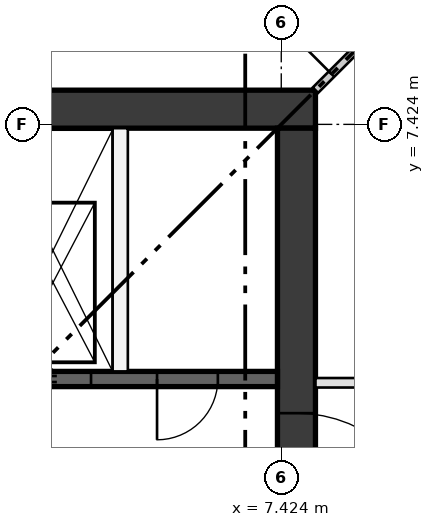
"""IFC4 building model, lengths in metres.
Left out: names, types, materials, properties, quantities, classifications, styles, units other than length and angle.
Written with IfcOpenShell. Run it as: python <this file> out.ifc"""

import sys

from ifc_helpers import new_model, si_unit, direction, frame, frame_2d, origin, place, context, subcontext, project, spatial, rectangle, extrude, element, fill, save


model = new_model("IFC4")
c1 = context("Model", 3, precision=1e-05, world=origin(), true_north=direction((0.0, 1.0)))
c2 = subcontext(c1, "Body", "Model", "MODEL_VIEW")
j1 = project(units=[si_unit("LENGTHUNIT", "METRE"), si_unit("PLANEANGLEUNIT", "RADIAN")], contexts=[c1])
p1 = place(None, origin())
s1 = spatial("IfcSite", under=j1, at=p1, CompositionType="ELEMENT")
p2 = place(p1, origin())
s2 = spatial("IfcBuilding", under=s1, at=p2, CompositionType="ELEMENT")
p3 = place(p2, frame((0.0, 0.0, 224.5)))
s3 = spatial("IfcBuildingStorey", under=s2, at=p3, CompositionType="ELEMENT", Elevation=224.5)
p4 = place(p3, frame((-7.874, 7.624, 0.0), z_axis=(0.0, 0.0, 1.0), x_axis=(1.0, 0.0, 0.0)))
e1 = element("IfcWall", 1, at=p4, inside=s3, PredefinedType="SHEAR", context=c2, shape_type="SweptSolid", body=[
    extrude(rectangle(XDim=15.748, YDim=0.5, at=frame_2d((7.874, 0.0))), origin(), (0.0, 0.0, 1.0), 3.35),
])
p5 = place(p3, frame((7.624, -7.374, 0.0), z_axis=(0.0, 0.0, 1.0), x_axis=(0.0, 1.0, 0.0)))
e2 = element("IfcWall", 2, at=p5, inside=s3, PredefinedType="SHEAR", context=c2, shape_type="SweptSolid", body=[
    extrude(rectangle(XDim=14.748, YDim=0.5, at=frame_2d((7.374, 0.0))), origin(), (0.0, 0.0, 1.0), 3.35),
])
p6 = place(p5, frame((6.874, 0.0, 0.0)))
e3 = element("IfcOpeningElement", 3, at=p6, cuts=e2, PredefinedType="OPENING", context=c2, shape_type="SweptSolid", body=[
    extrude(rectangle(XDim=1.0, YDim=2.1, at=frame_2d((0.5, 1.05))), frame((0.0, 0.26, 0.0), z_axis=(0.0, -1.0, 0.0), x_axis=(1.0, 0.0, 0.0)), (0.0, 0.0, 1.0), 0.52),
])
p7 = place(p5, frame((3.75, 0.0, 0.0)))
e4 = element("IfcOpeningElement", 4, at=p7, cuts=e2, PredefinedType="OPENING", context=c2, shape_type="SweptSolid", body=[
    extrude(rectangle(XDim=1.8, YDim=2.1, at=frame_2d((0.9, 1.05))), frame((0.0, 0.26, 0.0), z_axis=(0.0, -1.0, 0.0), x_axis=(1.0, 0.0, 0.0)), (0.0, 0.0, 1.0), 0.52),
])
p8 = place(p5, frame((9.198, 0.0, 0.0)))
e5 = element("IfcOpeningElement", 5, at=p8, cuts=e2, PredefinedType="OPENING", context=c2, shape_type="SweptSolid", body=[
    extrude(rectangle(XDim=1.8, YDim=2.1, at=frame_2d((0.9, 1.05))), frame((0.0, 0.26, 0.0), z_axis=(0.0, -1.0, 0.0), x_axis=(1.0, 0.0, 0.0)), (0.0, 0.0, 1.0), 0.52),
])
p9 = place(p3, frame((0.0, 4.074, 0.0), z_axis=(0.0, 0.0, 1.0), x_axis=(1.0, 0.0, 0.0)))
e6 = element("IfcWall", 6, at=p9, inside=s3, PredefinedType="SHEAR", context=c2, shape_type="SweptSolid", body=[
    extrude(rectangle(XDim=7.374, YDim=0.2, at=frame_2d((3.687, 0.0))), origin(), (0.0, 0.0, 1.0), 3.0),
])
p10 = place(p9, frame((0.384, 0.0, 0.0)))
e7 = element("IfcOpeningElement", 7, at=p10, cuts=e6, PredefinedType="OPENING", context=c2, shape_type="SweptSolid", body=[
    extrude(rectangle(XDim=1.0, YDim=2.1, at=frame_2d((0.5, 1.05))), frame((0.0, 0.11, 0.0), z_axis=(0.0, -1.0, 0.0), x_axis=(1.0, 0.0, 0.0)), (0.0, 0.0, 1.0), 0.22),
])
p11 = place(p9, frame((2.153, 0.0, 0.0)))
e8 = element("IfcOpeningElement", 8, at=p11, cuts=e6, PredefinedType="OPENING", context=c2, shape_type="SweptSolid", body=[
    extrude(rectangle(XDim=1.0, YDim=2.1, at=frame_2d((0.5, 1.05))), frame((0.0, 0.11, 0.0), z_axis=(0.0, -1.0, 0.0), x_axis=(1.0, 0.0, 0.0)), (0.0, 0.0, 1.0), 0.22),
])
p12 = place(p9, frame((3.921, 0.0, 0.0)))
e9 = element("IfcOpeningElement", 9, at=p12, cuts=e6, PredefinedType="OPENING", context=c2, shape_type="SweptSolid", body=[
    extrude(rectangle(XDim=1.0, YDim=2.1, at=frame_2d((0.5, 1.05))), frame((0.0, 0.11, 0.0), z_axis=(0.0, -1.0, 0.0), x_axis=(1.0, 0.0, 0.0)), (0.0, 0.0, 1.0), 0.22),
])
p13 = place(p9, frame((5.79, 0.0, 0.0)))
e10 = element("IfcOpeningElement", 10, at=p13, cuts=e6, PredefinedType="OPENING", context=c2, shape_type="SweptSolid", body=[
    extrude(rectangle(XDim=0.8, YDim=2.1, at=frame_2d((0.4, 1.05))), frame((0.0, 0.11, 0.0), z_axis=(0.0, -1.0, 0.0), x_axis=(1.0, 0.0, 0.0)), (0.0, 0.0, 1.0), 0.22),
])
p14 = place(p3, frame((5.305, 4.174, 0.0), z_axis=(0.0, 0.0, 1.0), x_axis=(0.0, 1.0, 0.0)))
e11 = element("IfcWall", 11, at=p14, inside=s3, PredefinedType="PARTITIONING", context=c2, shape_type="SweptSolid", body=[
    extrude(rectangle(XDim=3.2, YDim=0.2, at=frame_2d((1.6, 0.0))), origin(), (0.0, 0.0, 1.0), 3.0),
])
p15 = place(p3, frame((7.874, 4.024, 0.0), z_axis=(0.0, 0.0, 1.0), x_axis=(1.0, 0.0, 0.0)))
e12 = element("IfcWall", 12, at=p15, inside=s3, PredefinedType="PARTITIONING", context=c2, shape_type="SweptSolid", body=[
    extrude(rectangle(XDim=2.317, YDim=0.125, at=frame_2d((1.158, 0.0))), origin(), (0.0, 0.0, 1.0), 3.0),
])
p16 = place(p15, frame((0.7, 0.0, 0.0)))
e13 = element("IfcOpeningElement", 13, at=p16, cuts=e12, PredefinedType="OPENING", context=c2, shape_type="SweptSolid", body=[
    extrude(rectangle(XDim=1.0, YDim=2.1, at=frame_2d((0.5, 1.05))), frame((0.0, 0.073, 0.0), z_axis=(0.0, -1.0, 0.0), x_axis=(1.0, 0.0, 0.0)), (0.0, 0.0, 1.0), 0.145),
])
p17 = place(p3, frame((7.874, 7.874, 0.0), z_axis=(0.0, 0.0, 1.0), x_axis=(0.707106781187, 0.707106781187, 0.0)))
e14 = element("IfcWall", 14, at=p17, inside=s3, PredefinedType="PARTITIONING", context=c2, shape_type="SweptSolid", body=[
    extrude(rectangle(XDim=2.835, YDim=0.1, at=frame_2d((1.417, 0.0))), origin(), (0.0, 0.0, 1.0), 3.0),
])
p18 = place(p17, frame((0.3, 0.0, 0.0)))
e15 = element("IfcOpeningElement", 15, at=p18, cuts=e14, PredefinedType="OPENING", context=c2, shape_type="SweptSolid", body=[
    extrude(rectangle(XDim=1.0, YDim=2.1, at=frame_2d((0.5, 1.05))), frame((0.0, 0.06, 0.0), z_axis=(0.0, -1.0, 0.0), x_axis=(1.0, 0.0, 0.0)), (0.0, 0.0, 1.0), 0.12),
])
p19 = place(p12, frame((1.0, 0.0, 0.0), z_axis=(0.0, 0.0, 1.0), x_axis=(-1.0, 0.0, 0.0)))
e16 = element("IfcDoor", 16, at=p19, inside=s3, OperationType="DOUBLE_DOOR_SLIDING", PredefinedType="DOOR", context=c2, shape_type="SweptSolid", body=[
    extrude(rectangle(XDim=1.0, YDim=2.1, at=frame_2d((0.5, 1.05))), frame((0.0, 0.025, 0.0), z_axis=(0.0, -1.0, 0.0), x_axis=(1.0, 0.0, 0.0)), (0.0, 0.0, 1.0), 0.05),
])
fill(e9, e16)
p20 = place(p13, frame((0.8, 0.0, 0.0), z_axis=(0.0, 0.0, 1.0), x_axis=(-1.0, 0.0, 0.0)))
e17 = element("IfcDoor", 17, at=p20, inside=s3, OperationType="SINGLE_SWING_LEFT", PredefinedType="DOOR", context=c2, shape_type="SweptSolid", body=[
    extrude(rectangle(XDim=0.8, YDim=2.1, at=frame_2d((0.4, 1.05))), frame((0.0, 0.025, 0.0), z_axis=(0.0, -1.0, 0.0), x_axis=(1.0, 0.0, 0.0)), (0.0, 0.0, 1.0), 0.05),
])
fill(e10, e17)
p21 = place(p8, frame((1.8, 0.0, 0.0), z_axis=(0.0, 0.0, 1.0), x_axis=(-1.0, 0.0, 0.0)))
e18 = element("IfcDoor", 18, at=p21, inside=s3, OperationType="DOUBLE_DOOR_SINGLE_SWING", PredefinedType="DOOR", context=c2, shape_type="SweptSolid", body=[
    extrude(rectangle(XDim=1.8, YDim=2.1, at=frame_2d((0.9, 1.05))), frame((0.0, 0.025, 0.0), z_axis=(0.0, -1.0, 0.0), x_axis=(1.0, 0.0, 0.0)), (0.0, 0.0, 1.0), 0.05),
])
fill(e5, e18)
p22 = place(p18, origin())
e19 = element("IfcDoor", 19, at=p22, inside=s3, OperationType="SINGLE_SWING_LEFT", PredefinedType="DOOR", context=c2, shape_type="SweptSolid", body=[
    extrude(rectangle(XDim=1.0, YDim=2.1, at=frame_2d((0.5, 1.05))), frame((0.0, 0.025, 0.0), z_axis=(0.0, -1.0, 0.0), x_axis=(1.0, 0.0, 0.0)), (0.0, 0.0, 1.0), 0.05),
])
fill(e15, e19)
save(model, sys.argv[1])
